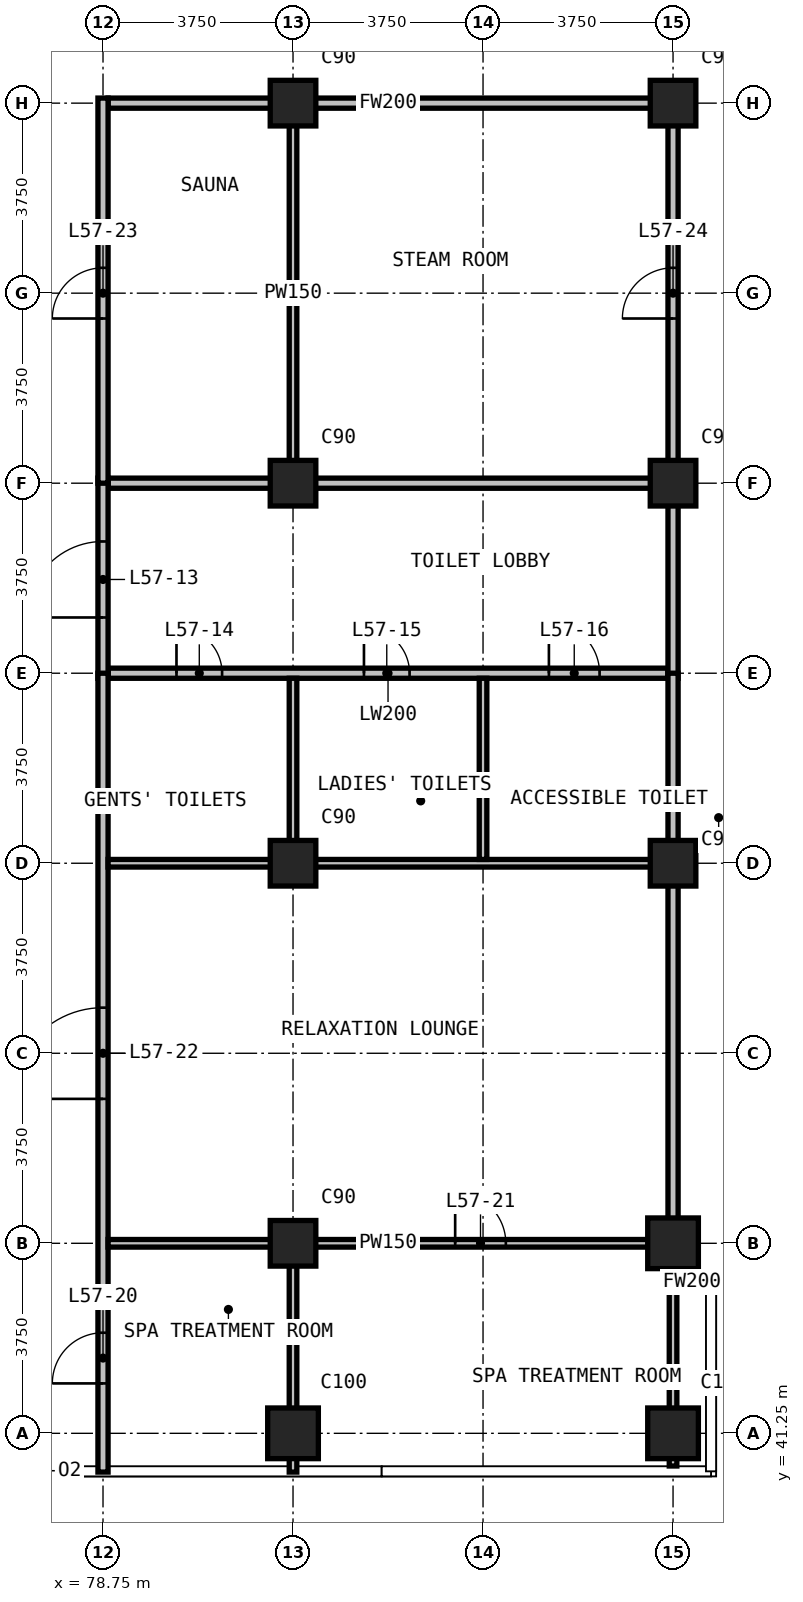
"""IFC4 building model, lengths in metres.
Left out: names, types, materials, properties, quantities, classifications, styles, units other than length and angle.
Written with IfcOpenShell. Run it as: python <this file> out.ifc"""

import sys

from ifc_helpers import new_model, si_unit, direction, frame, frame_2d, origin, origin_2d, place, context, subcontext, project, spatial, rectangle, extrude, element, fill, save


model = new_model("IFC4")
c1 = context("Model", 3, precision=1e-05, world=origin(), true_north=direction((0.0, 1.0)))
c2 = subcontext(c1, "Body", "Model", "MODEL_VIEW")
j1 = project(units=[si_unit("LENGTHUNIT", "METRE"), si_unit("PLANEANGLEUNIT", "RADIAN")], contexts=[c1])
p1 = place(None, origin())
s1 = spatial("IfcSite", under=j1, at=p1, CompositionType="ELEMENT")
p2 = place(p1, origin())
s2 = spatial("IfcBuilding", under=s1, at=p2, CompositionType="ELEMENT")
p3 = place(p2, frame((0.0, 0.0, 221.1)))
s3 = spatial("IfcBuildingStorey", under=s2, at=p3, CompositionType="ELEMENT", Elevation=221.1)
p4 = place(p3, frame((82.5, 41.25, 0.0), z_axis=(0.0, 0.0, 1.0), x_axis=(1.0, 0.0, 0.0)))
e1 = element("IfcColumn", 1, at=p4, inside=s3, PredefinedType="COLUMN", context=c2, shape_type="SweptSolid", body=[
    extrude(rectangle(XDim=1.0, YDim=1.0, at=origin_2d()), origin(), (0.0, 0.0, 1.0), 3.6),
])
for number, where, z_axis, x_axis in (
    (2, (82.5, 45.0, 0.0), (0.0, 0.0, 1.0), (1.0, 0.0, 0.0)),
    (3, (82.5, 52.5, 0.0), (0.0, 0.0, 1.0), (1.0, 0.0, 0.0)),
    (4, (82.5, 60.0, 0.0), (0.0, 0.0, 1.0), (1.0, 0.0, 0.0)),
    (5, (82.5, 67.5, 0.0), (0.0, 0.0, 1.0), (1.0, 0.0, 0.0)),
):
    element("IfcColumn", number, at=place(p3, frame(where, z_axis=z_axis, x_axis=x_axis)), inside=s3, PredefinedType="COLUMN", context=c2, shape_type="SweptSolid", body=[
        extrude(rectangle(XDim=0.9, YDim=0.9, at=origin_2d()), origin(), (0.0, 0.0, 1.0), 3.6),
    ])
for number, where, z_axis, x_axis in (
    (6, (90.0, 41.25, 0.0), (0.0, 0.0, 1.0), (1.0, 0.0, 0.0)),
    (7, (90.0, 45.0, 0.0), (0.0, 0.0, 1.0), (1.0, 0.0, 0.0)),
):
    element("IfcColumn", number, at=place(p3, frame(where, z_axis=z_axis, x_axis=x_axis)), inside=s3, PredefinedType="COLUMN", context=c2, shape_type="SweptSolid", body=[
        extrude(rectangle(XDim=1.0, YDim=1.0, at=origin_2d()), origin(), (0.0, 0.0, 1.0), 3.6),
    ])
for number, where, z_axis, x_axis in (
    (8, (90.0, 52.5, 0.0), (0.0, 0.0, 1.0), (1.0, 0.0, 0.0)),
    (9, (90.0, 60.0, 0.0), (0.0, 0.0, 1.0), (1.0, 0.0, 0.0)),
    (10, (90.0, 67.5, 0.0), (0.0, 0.0, 1.0), (1.0, 0.0, 0.0)),
):
    element("IfcColumn", number, at=place(p3, frame(where, z_axis=z_axis, x_axis=x_axis)), inside=s3, PredefinedType="COLUMN", context=c2, shape_type="SweptSolid", body=[
        extrude(rectangle(XDim=0.9, YDim=0.9, at=origin_2d()), origin(), (0.0, 0.0, 1.0), 3.6),
    ])
p5 = place(p3, frame((78.85, 56.25, 0.0), z_axis=(0.0, 0.0, 1.0), x_axis=(1.0, 0.0, 0.0)))
e11 = element("IfcWall", 11, at=p5, inside=s3, PredefinedType="PARTITIONING", context=c2, shape_type="SweptSolid", body=[
    extrude(rectangle(XDim=11.05, YDim=0.2, at=frame_2d((5.525, 0.0))), origin(), (0.0, 0.0, 1.0), 3.3),
])
p6 = place(p5, frame((1.35, 0.0, 0.0)))
e12 = element("IfcOpeningElement", 12, at=p6, cuts=e11, PredefinedType="OPENING", context=c2, shape_type="SweptSolid", body=[
    extrude(rectangle(XDim=0.9, YDim=2.2, at=frame_2d((0.45, 1.1))), frame((0.0, 0.11, 0.0), z_axis=(0.0, -1.0, 0.0), x_axis=(1.0, 0.0, 0.0)), (0.0, 0.0, 1.0), 0.22),
])
p7 = place(p5, frame((5.05, 0.0, 0.0)))
e13 = element("IfcOpeningElement", 13, at=p7, cuts=e11, PredefinedType="OPENING", context=c2, shape_type="SweptSolid", body=[
    extrude(rectangle(XDim=0.9, YDim=2.2, at=frame_2d((0.45, 1.1))), frame((0.0, 0.11, 0.0), z_axis=(0.0, -1.0, 0.0), x_axis=(1.0, 0.0, 0.0)), (0.0, 0.0, 1.0), 0.22),
])
p8 = place(p5, frame((8.7, 0.0, 0.0)))
e14 = element("IfcOpeningElement", 14, at=p8, cuts=e11, PredefinedType="OPENING", context=c2, shape_type="SweptSolid", body=[
    extrude(rectangle(XDim=1.0, YDim=2.2, at=frame_2d((0.5, 1.1))), frame((0.0, 0.11, 0.0), z_axis=(0.0, -1.0, 0.0), x_axis=(1.0, 0.0, 0.0)), (0.0, 0.0, 1.0), 0.22),
])
p9 = place(p3, frame((78.85, 60.0, 0.0), z_axis=(0.0, 0.0, 1.0), x_axis=(1.0, 0.0, 0.0)))
e15 = element("IfcWall", 15, at=p9, inside=s3, PredefinedType="PARTITIONING", context=c2, shape_type="SweptSolid", body=[
    extrude(rectangle(XDim=11.05, YDim=0.2, at=frame_2d((5.525, 0.0))), origin(), (0.0, 0.0, 1.0), 3.3),
])
p10 = place(p3, frame((78.75, 56.15, 0.0), z_axis=(0.0, 0.0, 1.0), x_axis=(0.0, 1.0, 0.0)))
e16 = element("IfcWall", 16, at=p10, inside=s3, PredefinedType="PARTITIONING", context=c2, shape_type="SweptSolid", body=[
    extrude(rectangle(XDim=3.95, YDim=0.2, at=frame_2d((1.975, 0.0))), origin(), (0.0, 0.0, 1.0), 3.3),
])
p11 = place(p10, frame((1.2, 0.0, 0.0)))
e17 = element("IfcOpeningElement", 17, at=p11, cuts=e16, PredefinedType="OPENING", context=c2, shape_type="SweptSolid", body=[
    extrude(rectangle(XDim=1.5, YDim=2.2, at=frame_2d((0.75, 1.1))), frame((0.0, 0.11, 0.0), z_axis=(0.0, -1.0, 0.0), x_axis=(1.0, 0.0, 0.0)), (0.0, 0.0, 1.0), 0.22),
])
p12 = place(p3, frame((90.0, 56.15, 0.0), z_axis=(0.0, 0.0, 1.0), x_axis=(0.0, 1.0, 0.0)))
e18 = element("IfcWall", 18, at=p12, inside=s3, PredefinedType="PARTITIONING", context=c2, shape_type="SweptSolid", body=[
    extrude(rectangle(XDim=3.95, YDim=0.2, at=frame_2d((1.975, 0.0))), origin(), (0.0, 0.0, 1.0), 3.3),
])
p13 = place(p3, frame((90.1, 44.235, 0.0), z_axis=(0.0, 0.0, 1.0), x_axis=(1.0, 0.0, 0.0)))
e19 = element("IfcWall", 19, at=p13, inside=s3, PredefinedType="PARTITIONING", context=c2, shape_type="SweptSolid", body=[
    extrude(rectangle(XDim=0.545, YDim=0.2, at=frame_2d((0.272, 0.0))), origin(), (0.0, 0.0, 1.0), 3.3),
])
p14 = place(p3, frame((78.85, 67.5, 0.0), z_axis=(0.0, 0.0, 1.0), x_axis=(1.0, 0.0, 0.0)))
e20 = element("IfcWall", 20, at=p14, inside=s3, PredefinedType="PARTITIONING", context=c2, shape_type="SweptSolid", body=[
    extrude(rectangle(XDim=11.05, YDim=0.2, at=frame_2d((5.525, 0.0))), origin(), (0.0, 0.0, 1.0), 3.3),
])
p15 = place(p3, frame((78.75, 40.485, 0.0), z_axis=(0.0, 0.0, 1.0), x_axis=(0.0, 1.0, 0.0)))
e21 = element("IfcWall", 21, at=p15, inside=s3, PredefinedType="PARTITIONING", context=c2, shape_type="SweptSolid", body=[
    extrude(rectangle(XDim=15.765, YDim=0.2, at=frame_2d((7.882, 0.0))), origin(), (0.0, 0.0, 1.0), 3.3),
])
p16 = place(p15, frame((1.75, 0.0, 0.0)))
e22 = element("IfcOpeningElement", 22, at=p16, cuts=e21, PredefinedType="OPENING", context=c2, shape_type="SweptSolid", body=[
    extrude(rectangle(XDim=1.0, YDim=2.2, at=frame_2d((0.5, 1.1))), frame((0.0, 0.11, 0.0), z_axis=(0.0, -1.0, 0.0), x_axis=(1.0, 0.0, 0.0)), (0.0, 0.0, 1.0), 0.22),
])
p17 = place(p15, frame((7.365, 0.0, 0.0)))
e23 = element("IfcOpeningElement", 23, at=p17, cuts=e21, PredefinedType="OPENING", context=c2, shape_type="SweptSolid", body=[
    extrude(rectangle(XDim=1.8, YDim=2.2, at=frame_2d((0.9, 1.1))), frame((0.0, 0.11, 0.0), z_axis=(0.0, -1.0, 0.0), x_axis=(1.0, 0.0, 0.0)), (0.0, 0.0, 1.0), 0.22),
])
p18 = place(p3, frame((78.75, 60.0, 0.0), z_axis=(0.0, 0.0, 1.0), x_axis=(0.0, 1.0, 0.0)))
e24 = element("IfcWall", 24, at=p18, inside=s3, PredefinedType="PARTITIONING", context=c2, shape_type="SweptSolid", body=[
    extrude(rectangle(XDim=7.6, YDim=0.2, at=frame_2d((3.8, 0.0))), origin(), (0.0, 0.0, 1.0), 3.3),
])
p19 = place(p18, frame((3.25, 0.0, 0.0)))
e25 = element("IfcOpeningElement", 25, at=p19, cuts=e24, PredefinedType="OPENING", context=c2, shape_type="SweptSolid", body=[
    extrude(rectangle(XDim=1.0, YDim=2.2, at=frame_2d((0.5, 1.1))), frame((0.0, 0.11, 0.0), z_axis=(0.0, -1.0, 0.0), x_axis=(1.0, 0.0, 0.0)), (0.0, 0.0, 1.0), 0.22),
])
p20 = place(p3, frame((90.0, 44.135, 0.0), z_axis=(0.0, 0.0, 1.0), x_axis=(0.0, 1.0, 0.0)))
e26 = element("IfcWall", 26, at=p20, inside=s3, PredefinedType="PARTITIONING", context=c2, shape_type="SweptSolid", body=[
    extrude(rectangle(XDim=12.115, YDim=0.2, at=frame_2d((6.058, 0.0))), origin(), (0.0, 0.0, 1.0), 3.3),
])
p21 = place(p3, frame((90.0, 60.0, 0.0), z_axis=(0.0, 0.0, 1.0), x_axis=(0.0, 1.0, 0.0)))
e27 = element("IfcWall", 27, at=p21, inside=s3, PredefinedType="PARTITIONING", context=c2, shape_type="SweptSolid", body=[
    extrude(rectangle(XDim=7.6, YDim=0.2, at=frame_2d((3.8, 0.0))), origin(), (0.0, 0.0, 1.0), 3.3),
])
p22 = place(p21, frame((3.25, 0.0, 0.0)))
e28 = element("IfcOpeningElement", 28, at=p22, cuts=e27, PredefinedType="OPENING", context=c2, shape_type="SweptSolid", body=[
    extrude(rectangle(XDim=1.0, YDim=2.2, at=frame_2d((0.5, 1.1))), frame((0.0, 0.11, 0.0), z_axis=(0.0, -1.0, 0.0), x_axis=(1.0, 0.0, 0.0)), (0.0, 0.0, 1.0), 0.22),
])
p23 = place(p3, frame((78.85, 45.0, 0.0), z_axis=(0.0, 0.0, 1.0), x_axis=(1.0, 0.0, 0.0)))
e29 = element("IfcWall", 29, at=p23, inside=s3, PredefinedType="PARTITIONING", context=c2, shape_type="SweptSolid", body=[
    extrude(rectangle(XDim=11.05, YDim=0.15, at=frame_2d((5.525, 0.0))), origin(), (0.0, 0.0, 1.0), 3.3),
])
p24 = place(p23, frame((6.85, 0.0, 0.0)))
e30 = element("IfcOpeningElement", 30, at=p24, cuts=e29, PredefinedType="OPENING", context=c2, shape_type="SweptSolid", body=[
    extrude(rectangle(XDim=1.0, YDim=2.2, at=frame_2d((0.5, 1.1))), frame((0.0, 0.085, 0.0), z_axis=(0.0, -1.0, 0.0), x_axis=(1.0, 0.0, 0.0)), (0.0, 0.0, 1.0), 0.17),
])
p25 = place(p3, frame((78.85, 52.5, 0.0), z_axis=(0.0, 0.0, 1.0), x_axis=(1.0, 0.0, 0.0)))
e31 = element("IfcWall", 31, at=p25, inside=s3, PredefinedType="PARTITIONING", context=c2, shape_type="SweptSolid", body=[
    extrude(rectangle(XDim=11.05, YDim=0.15, at=frame_2d((5.525, 0.0))), origin(), (0.0, 0.0, 1.0), 3.3),
])
p26 = place(p3, frame((82.5, 40.485, 0.0), z_axis=(0.0, 0.0, 1.0), x_axis=(0.0, 1.0, 0.0)))
e32 = element("IfcWall", 32, at=p26, inside=s3, PredefinedType="PARTITIONING", context=c2, shape_type="SweptSolid", body=[
    extrude(rectangle(XDim=4.44, YDim=0.15, at=frame_2d((2.22, 0.0))), origin(), (0.0, 0.0, 1.0), 3.3),
])
p27 = place(p3, frame((82.5, 52.575, 0.0), z_axis=(0.0, 0.0, 1.0), x_axis=(0.0, 1.0, 0.0)))
e33 = element("IfcWall", 33, at=p27, inside=s3, PredefinedType="PARTITIONING", context=c2, shape_type="SweptSolid", body=[
    extrude(rectangle(XDim=3.575, YDim=0.15, at=frame_2d((1.788, 0.0))), origin(), (0.0, 0.0, 1.0), 3.3),
])
p28 = place(p3, frame((82.5, 60.1, 0.0), z_axis=(0.0, 0.0, 1.0), x_axis=(0.0, 1.0, 0.0)))
e34 = element("IfcWall", 34, at=p28, inside=s3, PredefinedType="PARTITIONING", context=c2, shape_type="SweptSolid", body=[
    extrude(rectangle(XDim=7.3, YDim=0.15, at=frame_2d((3.65, 0.0))), origin(), (0.0, 0.0, 1.0), 3.3),
])
p29 = place(p3, frame((86.25, 52.575, 0.0), z_axis=(0.0, 0.0, 1.0), x_axis=(0.0, 1.0, 0.0)))
e35 = element("IfcWall", 35, at=p29, inside=s3, PredefinedType="PARTITIONING", context=c2, shape_type="SweptSolid", body=[
    extrude(rectangle(XDim=3.575, YDim=0.15, at=frame_2d((1.788, 0.0))), origin(), (0.0, 0.0, 1.0), 3.3),
])
p30 = place(p3, frame((90.0, 40.605, 0.0), z_axis=(0.0, 0.0, 1.0), x_axis=(0.0, 1.0, 0.0)))
e36 = element("IfcWall", 36, at=p30, inside=s3, PredefinedType="PARTITIONING", context=c2, shape_type="SweptSolid", body=[
    extrude(rectangle(XDim=3.6, YDim=0.15, at=frame_2d((1.8, 0.0))), origin(), (0.0, 0.0, 1.0), 3.3),
])
p31 = place(p11, origin())
e37 = element("IfcDoor", 37, at=p31, inside=s3, OperationType="DOUBLE_DOOR_SINGLE_SWING", PredefinedType="DOOR", context=c2, shape_type="SweptSolid", body=[
    extrude(rectangle(XDim=1.5, YDim=2.2, at=frame_2d((0.75, 1.1))), frame((0.0, 0.025, 0.0), z_axis=(0.0, -1.0, 0.0), x_axis=(1.0, 0.0, 0.0)), (0.0, 0.0, 1.0), 0.05),
])
fill(e17, e37)
p32 = place(p6, origin())
e38 = element("IfcDoor", 38, at=p32, inside=s3, OperationType="SINGLE_SWING_LEFT", PredefinedType="DOOR", context=c2, shape_type="SweptSolid", body=[
    extrude(rectangle(XDim=0.9, YDim=2.2, at=frame_2d((0.45, 1.1))), frame((0.0, 0.025, 0.0), z_axis=(0.0, -1.0, 0.0), x_axis=(1.0, 0.0, 0.0)), (0.0, 0.0, 1.0), 0.05),
])
fill(e12, e38)
p33 = place(p7, origin())
e39 = element("IfcDoor", 39, at=p33, inside=s3, OperationType="SINGLE_SWING_LEFT", PredefinedType="DOOR", context=c2, shape_type="SweptSolid", body=[
    extrude(rectangle(XDim=0.9, YDim=2.2, at=frame_2d((0.45, 1.1))), frame((0.0, 0.025, 0.0), z_axis=(0.0, -1.0, 0.0), x_axis=(1.0, 0.0, 0.0)), (0.0, 0.0, 1.0), 0.05),
])
fill(e13, e39)
p34 = place(p8, origin())
e40 = element("IfcDoor", 40, at=p34, inside=s3, OperationType="SINGLE_SWING_RIGHT", PredefinedType="DOOR", context=c2, shape_type="SweptSolid", body=[
    extrude(rectangle(XDim=1.0, YDim=2.2, at=frame_2d((0.5, 1.1))), frame((0.0, 0.025, 0.0), z_axis=(0.0, -1.0, 0.0), x_axis=(1.0, 0.0, 0.0)), (0.0, 0.0, 1.0), 0.05),
])
fill(e14, e40)
p35 = place(p16, origin())
e41 = element("IfcDoor", 41, at=p35, inside=s3, OperationType="SINGLE_SWING_LEFT", PredefinedType="DOOR", context=c2, shape_type="SweptSolid", body=[
    extrude(rectangle(XDim=1.0, YDim=2.2, at=frame_2d((0.5, 1.1))), frame((0.0, 0.025, 0.0), z_axis=(0.0, -1.0, 0.0), x_axis=(1.0, 0.0, 0.0)), (0.0, 0.0, 1.0), 0.05),
])
fill(e22, e41)
p36 = place(p24, origin())
e42 = element("IfcDoor", 42, at=p36, inside=s3, OperationType="SINGLE_SWING_RIGHT", PredefinedType="DOOR", context=c2, shape_type="SweptSolid", body=[
    extrude(rectangle(XDim=1.0, YDim=2.2, at=frame_2d((0.5, 1.1))), frame((0.0, 0.025, 0.0), z_axis=(0.0, -1.0, 0.0), x_axis=(1.0, 0.0, 0.0)), (0.0, 0.0, 1.0), 0.05),
])
fill(e30, e42)
p37 = place(p17, origin())
e43 = element("IfcDoor", 43, at=p37, inside=s3, OperationType="DOUBLE_DOOR_SINGLE_SWING", PredefinedType="DOOR", context=c2, shape_type="SweptSolid", body=[
    extrude(rectangle(XDim=1.8, YDim=2.2, at=frame_2d((0.9, 1.1))), frame((0.0, 0.025, 0.0), z_axis=(0.0, -1.0, 0.0), x_axis=(1.0, 0.0, 0.0)), (0.0, 0.0, 1.0), 0.05),
])
fill(e23, e43)
p38 = place(p19, origin())
e44 = element("IfcDoor", 44, at=p38, inside=s3, OperationType="SINGLE_SWING_LEFT", PredefinedType="DOOR", context=c2, shape_type="SweptSolid", body=[
    extrude(rectangle(XDim=1.0, YDim=2.2, at=frame_2d((0.5, 1.1))), frame((0.0, 0.025, 0.0), z_axis=(0.0, -1.0, 0.0), x_axis=(1.0, 0.0, 0.0)), (0.0, 0.0, 1.0), 0.05),
])
fill(e25, e44)
p39 = place(p22, origin())
e45 = element("IfcDoor", 45, at=p39, inside=s3, OperationType="SINGLE_SWING_LEFT", PredefinedType="DOOR", context=c2, shape_type="SweptSolid", body=[
    extrude(rectangle(XDim=1.0, YDim=2.2, at=frame_2d((0.5, 1.1))), frame((0.0, 0.025, 0.0), z_axis=(0.0, -1.0, 0.0), x_axis=(1.0, 0.0, 0.0)), (0.0, 0.0, 1.0), 0.05),
])
fill(e28, e45)
save(model, sys.argv[1])
